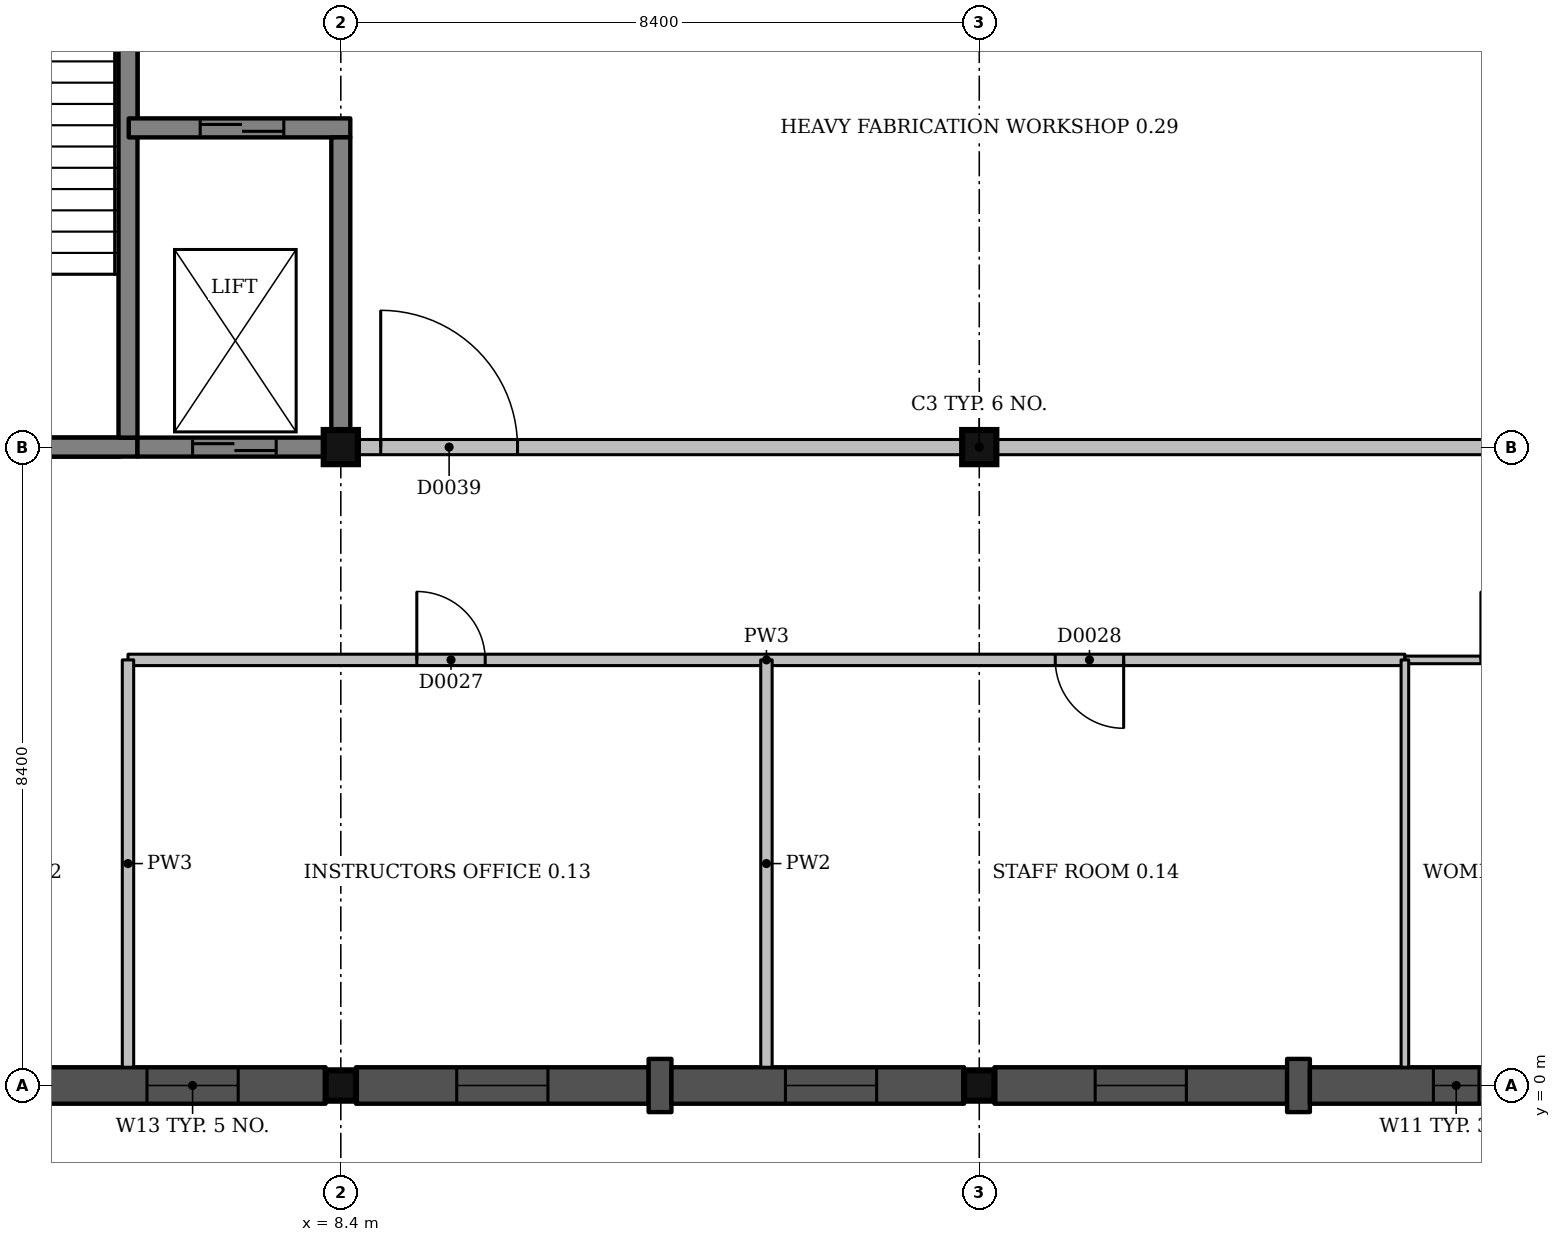
"""IFC4 building model, lengths in metres.
Left out: names, types, materials, properties, quantities, classifications, styles, units other than length and angle.
Written with IfcOpenShell. Run it as: python <this file> out.ifc"""

import sys

from ifc_helpers import new_model, si_unit, direction, frame, frame_2d, origin, origin_2d, place, context, subcontext, project, spatial, rectangle, extrude, element, fill, save


model = new_model("IFC4")
c1 = context("Model", 3, precision=1e-05, world=origin(), true_north=direction((0.0, 1.0)))
c2 = subcontext(c1, "Body", "Model", "MODEL_VIEW")
j1 = project(units=[si_unit("LENGTHUNIT", "METRE"), si_unit("PLANEANGLEUNIT", "RADIAN")], contexts=[c1])
p1 = place(None, origin())
s1 = spatial("IfcSite", under=j1, at=p1, CompositionType="ELEMENT")
p2 = place(p1, origin())
s2 = spatial("IfcBuilding", under=s1, at=p2, CompositionType="ELEMENT")
p3 = place(p2, origin())
s3 = spatial("IfcBuildingStorey", under=s2, at=p3, CompositionType="ELEMENT", Elevation=0.0)
p4 = place(p3, frame((8.4, 0.0, -1.5), z_axis=(0.0, 0.0, 1.0), x_axis=(1.0, 0.0, 0.0)))
e1 = element("IfcColumn", 1, at=p4, inside=s3, PredefinedType="COLUMN", context=c2, shape_type="SweptSolid", body=[
    extrude(rectangle(XDim=0.4, YDim=0.4, at=origin_2d()), origin(), (0.0, 0.0, 1.0), 6.0),
])
p5 = place(p3, frame((8.4, 8.4, -1.5), z_axis=(0.0, 0.0, 1.0), x_axis=(1.0, 0.0, 0.0)))
e2 = element("IfcColumn", 2, at=p5, inside=s3, PredefinedType="COLUMN", context=c2, shape_type="SweptSolid", body=[
    extrude(rectangle(XDim=0.45, YDim=0.45, at=origin_2d()), origin(), (0.0, 0.0, 1.0), 6.0),
])
p6 = place(p3, frame((16.8, 0.0, -1.5), z_axis=(0.0, 0.0, 1.0), x_axis=(1.0, 0.0, 0.0)))
e3 = element("IfcColumn", 3, at=p6, inside=s3, PredefinedType="COLUMN", context=c2, shape_type="SweptSolid", body=[
    extrude(rectangle(XDim=0.4, YDim=0.4, at=origin_2d()), origin(), (0.0, 0.0, 1.0), 6.0),
])
p7 = place(p3, frame((16.8, 8.4, -1.5), z_axis=(0.0, 0.0, 1.0), x_axis=(1.0, 0.0, 0.0)))
e4 = element("IfcColumn", 4, at=p7, inside=s3, PredefinedType="COLUMN", context=c2, shape_type="SweptSolid", body=[
    extrude(rectangle(XDim=0.45, YDim=0.45, at=origin_2d()), origin(), (0.0, 0.0, 1.0), 6.0),
])
p8 = place(p3, frame((5.5, 8.4, 0.0), z_axis=(0.0, 0.0, 1.0), x_axis=(1.0, 0.0, 0.0)))
e5 = element("IfcWall", 5, at=p8, inside=s3, PredefinedType="SHEAR", context=c2, shape_type="SweptSolid", body=[
    extrude(rectangle(XDim=2.675, YDim=0.2, at=frame_2d((1.337, 0.0))), origin(), (0.0, 0.0, 1.0), 4.5),
])
p9 = place(p8, frame((0.95, 0.0, 0.0)))
e6 = element("IfcOpeningElement", 6, at=p9, cuts=e5, PredefinedType="OPENING", context=c2, shape_type="SweptSolid", body=[
    extrude(rectangle(XDim=1.1, YDim=2.1, at=frame_2d((0.55, 1.05))), frame((0.0, 0.11, 0.0), z_axis=(0.0, -1.0, 0.0), x_axis=(1.0, 0.0, 0.0)), (0.0, 0.0, 1.0), 0.22),
])
p10 = place(p3, frame((5.5, 12.6, 0.0), z_axis=(0.0, 0.0, 1.0), x_axis=(1.0, 0.0, 0.0)))
e7 = element("IfcWall", 7, at=p10, inside=s3, PredefinedType="SHEAR", context=c2, shape_type="SweptSolid", body=[
    extrude(rectangle(XDim=3.0, YDim=0.2, at=frame_2d((1.5, 0.0))), origin(), (0.0, 0.0, 1.0), 4.5),
])
p11 = place(p10, frame((1.05, 0.0, 0.0)))
e8 = element("IfcOpeningElement", 8, at=p11, cuts=e7, PredefinedType="OPENING", context=c2, shape_type="SweptSolid", body=[
    extrude(rectangle(XDim=1.1, YDim=2.1, at=frame_2d((0.55, 1.05))), frame((0.0, 0.11, 0.0), z_axis=(0.0, -1.0, 0.0), x_axis=(1.0, 0.0, 0.0)), (0.0, 0.0, 1.0), 0.22),
])
p12 = place(p3, frame((5.6, 8.5, 0.0), z_axis=(0.0, 0.0, 1.0), x_axis=(0.0, 1.0, 0.0)))
e9 = element("IfcWall", 9, at=p12, inside=s3, PredefinedType="SHEAR", context=c2, shape_type="SweptSolid", body=[
    extrude(rectangle(XDim=4.0, YDim=0.2, at=frame_2d((2.0, 0.0))), origin(), (0.0, 0.0, 1.0), 4.5),
])
p13 = place(p3, frame((8.4, 8.625, 0.0), z_axis=(0.0, 0.0, 1.0), x_axis=(0.0, 1.0, 0.0)))
e10 = element("IfcWall", 10, at=p13, inside=s3, PredefinedType="SHEAR", context=c2, shape_type="SweptSolid", body=[
    extrude(rectangle(XDim=3.875, YDim=0.2, at=frame_2d((1.938, 0.0))), origin(), (0.0, 0.0, 1.0), 4.5),
])
p14 = place(p3, frame((0.2, 8.4, 0.0), z_axis=(0.0, 0.0, 1.0), x_axis=(1.0, 0.0, 0.0)))
e11 = element("IfcWall", 11, at=p14, inside=s3, PredefinedType="SHEAR", context=c2, shape_type="SweptSolid", body=[
    extrude(rectangle(XDim=5.3, YDim=0.25, at=frame_2d((2.65, 0.0))), origin(), (0.0, 0.0, 1.0), 4.5),
])
p15 = place(p14, frame((2.125, 0.0, 0.0)))
e12 = element("IfcOpeningElement", 12, at=p15, cuts=e11, PredefinedType="OPENING", context=c2, shape_type="SweptSolid", body=[
    extrude(rectangle(XDim=1.0, YDim=2.1, at=frame_2d((0.5, 1.05))), frame((0.0, 0.135, 0.0), z_axis=(0.0, -1.0, 0.0), x_axis=(1.0, 0.0, 0.0)), (0.0, 0.0, 1.0), 0.27),
])
p16 = place(p3, frame((5.6, 12.61, 0.0), z_axis=(0.0, 0.0, 1.0), x_axis=(0.0, 1.0, 0.0)))
e13 = element("IfcWall", 13, at=p16, inside=s3, PredefinedType="SHEAR", context=c2, shape_type="SweptSolid", body=[
    extrude(rectangle(XDim=4.065, YDim=0.25, at=frame_2d((2.032, 0.0))), origin(), (0.0, 0.0, 1.0), 4.5),
])
p17 = place(p3, frame((-0.125, 8.4, -1.5), z_axis=(0.0, 0.0, 1.0), x_axis=(1.0, 0.0, 0.0)))
e14 = element("IfcWall", 14, at=p17, inside=s3, PredefinedType="SHEAR", context=c2, shape_type="SweptSolid", body=[
    extrude(rectangle(XDim=5.85, YDim=0.25, at=frame_2d((2.925, 0.0))), origin(), (0.0, 0.0, 1.0), 1.5),
])
p18 = place(p3, frame((5.6, 8.525, -1.5), z_axis=(0.0, 0.0, 1.0), x_axis=(0.0, 1.0, 0.0)))
e15 = element("IfcWall", 15, at=p18, inside=s3, PredefinedType="SHEAR", context=c2, shape_type="SweptSolid", body=[
    extrude(rectangle(XDim=8.15, YDim=0.25, at=frame_2d((4.075, 0.0))), origin(), (0.0, 0.0, 1.0), 1.5),
])
p19 = place(p3, frame((5.725, 8.4, -1.5), z_axis=(0.0, 0.0, 1.0), x_axis=(1.0, 0.0, 0.0)))
e16 = element("IfcWall", 16, at=p19, inside=s3, PredefinedType="SHEAR", context=c2, shape_type="SweptSolid", body=[
    extrude(rectangle(XDim=2.8, YDim=0.25, at=frame_2d((1.4, 0.0))), origin(), (0.0, 0.0, 1.0), 1.5),
])
p20 = place(p3, frame((5.61, 12.6, -1.5), z_axis=(0.0, 0.0, 1.0), x_axis=(1.0, 0.0, 0.0)))
e17 = element("IfcWall", 17, at=p20, inside=s3, PredefinedType="SHEAR", context=c2, shape_type="SweptSolid", body=[
    extrude(rectangle(XDim=2.915, YDim=0.25, at=frame_2d((1.458, 0.0))), origin(), (0.0, 0.0, 1.0), 1.5),
])
p21 = place(p3, frame((8.4, 8.525, -1.5), z_axis=(0.0, 0.0, 1.0), x_axis=(0.0, 1.0, 0.0)))
e18 = element("IfcWall", 18, at=p21, inside=s3, PredefinedType="SHEAR", context=c2, shape_type="SweptSolid", body=[
    extrude(rectangle(XDim=3.95, YDim=0.25, at=frame_2d((1.975, 0.0))), origin(), (0.0, 0.0, 1.0), 1.5),
])
p22 = place(p3, frame((4.35, 0.0, 0.0), z_axis=(0.0, 0.0, 1.0), x_axis=(1.0, 0.0, 0.0)))
e19 = element("IfcWall", 19, at=p22, inside=s3, PredefinedType="SOLIDWALL", context=c2, shape_type="SweptSolid", body=[
    extrude(rectangle(XDim=3.85, YDim=0.48, at=frame_2d((1.925, 0.0))), origin(), (0.0, 0.0, 1.0), 3.45),
])
p23 = place(p22, frame((1.5, 0.0, 0.9)))
e20 = element("IfcOpeningElement", 20, at=p23, cuts=e19, PredefinedType="OPENING", context=c2, shape_type="SweptSolid", body=[
    extrude(rectangle(XDim=1.2, YDim=2.1, at=frame_2d((0.6, 1.05))), frame((0.0, 0.25, 0.0), z_axis=(0.0, -1.0, 0.0), x_axis=(1.0, 0.0, 0.0)), (0.0, 0.0, 1.0), 0.5),
])
p24 = place(p3, frame((8.6, 0.0, 0.0), z_axis=(0.0, 0.0, 1.0), x_axis=(1.0, 0.0, 0.0)))
e21 = element("IfcWall", 21, at=p24, inside=s3, PredefinedType="SOLIDWALL", context=c2, shape_type="SweptSolid", body=[
    extrude(rectangle(XDim=3.85, YDim=0.48, at=frame_2d((1.925, 0.0))), origin(), (0.0, 0.0, 1.0), 3.45),
])
p25 = place(p24, frame((1.325, 0.0, 0.9)))
e22 = element("IfcOpeningElement", 22, at=p25, cuts=e21, PredefinedType="OPENING", context=c2, shape_type="SweptSolid", body=[
    extrude(rectangle(XDim=1.2, YDim=2.1, at=frame_2d((0.6, 1.05))), frame((0.0, 0.25, 0.0), z_axis=(0.0, -1.0, 0.0), x_axis=(1.0, 0.0, 0.0)), (0.0, 0.0, 1.0), 0.5),
])
p26 = place(p3, frame((12.45, 0.0, 0.0), z_axis=(0.0, 0.0, 1.0), x_axis=(1.0, 0.0, 0.0)))
e23 = element("IfcWall", 23, at=p26, inside=s3, PredefinedType="SOLIDWALL", context=c2, shape_type="SweptSolid", body=[
    extrude(rectangle(XDim=0.3, YDim=0.7, at=frame_2d((0.15, 0.0))), origin(), (0.0, 0.0, 1.0), 3.45),
])
p27 = place(p3, frame((12.75, 0.0, 0.0), z_axis=(0.0, 0.0, 1.0), x_axis=(1.0, 0.0, 0.0)))
e24 = element("IfcWall", 24, at=p27, inside=s3, PredefinedType="SOLIDWALL", context=c2, shape_type="SweptSolid", body=[
    extrude(rectangle(XDim=3.85, YDim=0.48, at=frame_2d((1.925, 0.0))), origin(), (0.0, 0.0, 1.0), 3.45),
])
p28 = place(p27, frame((1.5, 0.0, 0.9)))
e25 = element("IfcOpeningElement", 25, at=p28, cuts=e24, PredefinedType="OPENING", context=c2, shape_type="SweptSolid", body=[
    extrude(rectangle(XDim=1.2, YDim=2.1, at=frame_2d((0.6, 1.05))), frame((0.0, 0.25, 0.0), z_axis=(0.0, -1.0, 0.0), x_axis=(1.0, 0.0, 0.0)), (0.0, 0.0, 1.0), 0.5),
])
p29 = place(p3, frame((17.0, 0.0, 0.0), z_axis=(0.0, 0.0, 1.0), x_axis=(1.0, 0.0, 0.0)))
e26 = element("IfcWall", 26, at=p29, inside=s3, PredefinedType="SOLIDWALL", context=c2, shape_type="SweptSolid", body=[
    extrude(rectangle(XDim=3.85, YDim=0.48, at=frame_2d((1.925, 0.0))), origin(), (0.0, 0.0, 1.0), 3.45),
])
p30 = place(p29, frame((1.325, 0.0, 0.9)))
e27 = element("IfcOpeningElement", 27, at=p30, cuts=e26, PredefinedType="OPENING", context=c2, shape_type="SweptSolid", body=[
    extrude(rectangle(XDim=1.2, YDim=2.1, at=frame_2d((0.6, 1.05))), frame((0.0, 0.25, 0.0), z_axis=(0.0, -1.0, 0.0), x_axis=(1.0, 0.0, 0.0)), (0.0, 0.0, 1.0), 0.5),
])
p31 = place(p3, frame((20.85, 0.0, 0.0), z_axis=(0.0, 0.0, 1.0), x_axis=(1.0, 0.0, 0.0)))
e28 = element("IfcWall", 28, at=p31, inside=s3, PredefinedType="SOLIDWALL", context=c2, shape_type="SweptSolid", body=[
    extrude(rectangle(XDim=0.3, YDim=0.7, at=frame_2d((0.15, 0.0))), origin(), (0.0, 0.0, 1.0), 3.45),
])
p32 = place(p3, frame((21.15, 0.0, 0.0), z_axis=(0.0, 0.0, 1.0), x_axis=(1.0, 0.0, 0.0)))
e29 = element("IfcWall", 29, at=p32, inside=s3, PredefinedType="SOLIDWALL", context=c2, shape_type="SweptSolid", body=[
    extrude(rectangle(XDim=3.85, YDim=0.48, at=frame_2d((1.925, 0.0))), origin(), (0.0, 0.0, 1.0), 3.45),
])
p33 = place(p32, frame((1.625, 0.0, 1.5)))
e30 = element("IfcOpeningElement", 30, at=p33, cuts=e29, PredefinedType="OPENING", context=c2, shape_type="SweptSolid", body=[
    extrude(rectangle(XDim=0.6, YDim=1.2, at=frame_2d((0.3, 0.6))), frame((0.0, 0.25, 0.0), z_axis=(0.0, -1.0, 0.0), x_axis=(1.0, 0.0, 0.0)), (0.0, 0.0, 1.0), 0.5),
])
p34 = place(p3, frame((5.6, 5.6, 0.0), z_axis=(0.0, 0.0, 1.0), x_axis=(1.0, 0.0, 0.0)))
e31 = element("IfcWall", 31, at=p34, inside=s3, PredefinedType="PARTITIONING", context=c2, shape_type="SweptSolid", body=[
    extrude(rectangle(XDim=16.8, YDim=0.15, at=frame_2d((8.4, 0.0))), origin(), (0.0, 0.0, 1.0), 3.5),
])
p35 = place(p34, frame((3.8, 0.0, 0.0)))
e32 = element("IfcOpeningElement", 32, at=p35, cuts=e31, PredefinedType="OPENING", context=c2, shape_type="SweptSolid", body=[
    extrude(rectangle(XDim=0.9, YDim=2.1, at=frame_2d((0.45, 1.05))), frame((0.0, 0.085, 0.0), z_axis=(0.0, -1.0, 0.0), x_axis=(1.0, 0.0, 0.0)), (0.0, 0.0, 1.0), 0.17),
])
p36 = place(p34, frame((12.2, 0.0, 0.0)))
e33 = element("IfcOpeningElement", 33, at=p36, cuts=e31, PredefinedType="OPENING", context=c2, shape_type="SweptSolid", body=[
    extrude(rectangle(XDim=0.9, YDim=2.1, at=frame_2d((0.45, 1.05))), frame((0.0, 0.085, 0.0), z_axis=(0.0, -1.0, 0.0), x_axis=(1.0, 0.0, 0.0)), (0.0, 0.0, 1.0), 0.17),
])
p37 = place(p3, frame((22.4, 5.6, 0.0), z_axis=(0.0, 0.0, 1.0), x_axis=(1.0, 0.0, 0.0)))
e34 = element("IfcWall", 34, at=p37, inside=s3, PredefinedType="PARTITIONING", context=c2, shape_type="SweptSolid", body=[
    extrude(rectangle(XDim=5.6, YDim=0.1, at=frame_2d((2.8, 0.0))), origin(), (0.0, 0.0, 1.0), 3.5),
])
p38 = place(p37, frame((1.0, 0.0, 0.0)))
e35 = element("IfcOpeningElement", 35, at=p38, cuts=e34, PredefinedType="OPENING", context=c2, shape_type="SweptSolid", body=[
    extrude(rectangle(XDim=0.9, YDim=2.1, at=frame_2d((0.45, 1.05))), frame((0.0, 0.06, 0.0), z_axis=(0.0, -1.0, 0.0), x_axis=(1.0, 0.0, 0.0)), (0.0, 0.0, 1.0), 0.12),
])
p39 = place(p37, frame((3.8, 0.0, 0.0)))
e36 = element("IfcOpeningElement", 36, at=p39, cuts=e34, PredefinedType="OPENING", context=c2, shape_type="SweptSolid", body=[
    extrude(rectangle(XDim=0.9, YDim=2.1, at=frame_2d((0.45, 1.05))), frame((0.0, 0.06, 0.0), z_axis=(0.0, -1.0, 0.0), x_axis=(1.0, 0.0, 0.0)), (0.0, 0.0, 1.0), 0.12),
])
p40 = place(p3, frame((8.625, 8.4, 0.0), z_axis=(0.0, 0.0, 1.0), x_axis=(1.0, 0.0, 0.0)))
e37 = element("IfcWall", 37, at=p40, inside=s3, PredefinedType="PARTITIONING", context=c2, shape_type="SweptSolid", body=[
    extrude(rectangle(XDim=7.95, YDim=0.2, at=frame_2d((3.975, 0.0))), origin(), (0.0, 0.0, 1.0), 3.5),
])
p41 = place(p40, frame((0.3, 0.0, 0.0)))
e38 = element("IfcOpeningElement", 38, at=p41, cuts=e37, PredefinedType="OPENING", context=c2, shape_type="SweptSolid", body=[
    extrude(rectangle(XDim=1.8, YDim=2.1, at=frame_2d((0.9, 1.05))), frame((0.0, 0.11, 0.0), z_axis=(0.0, -1.0, 0.0), x_axis=(1.0, 0.0, 0.0)), (0.0, 0.0, 1.0), 0.22),
])
p42 = place(p3, frame((17.025, 8.4, 0.0), z_axis=(0.0, 0.0, 1.0), x_axis=(1.0, 0.0, 0.0)))
e39 = element("IfcWall", 39, at=p42, inside=s3, PredefinedType="PARTITIONING", context=c2, shape_type="SweptSolid", body=[
    extrude(rectangle(XDim=7.95, YDim=0.2, at=frame_2d((3.975, 0.0))), origin(), (0.0, 0.0, 1.0), 3.5),
])
for number, where, z_axis, x_axis in (
    (40, (5.6, 0.24, 0.0), (0.0, 0.0, 1.0), (0.0, 1.0, 0.0)),
    (41, (14.0, 0.24, 0.0), (0.0, 0.0, 1.0), (0.0, 1.0, 0.0)),
):
    element("IfcWall", number, at=place(p3, frame(where, z_axis=z_axis, x_axis=x_axis)), inside=s3, PredefinedType="PARTITIONING", context=c2, shape_type="SweptSolid", body=[
        extrude(rectangle(XDim=5.36, YDim=0.15, at=frame_2d((2.68, 0.0))), origin(), (0.0, 0.0, 1.0), 4.15),
    ])
p43 = place(p3, frame((22.4, 0.24, 0.0), z_axis=(0.0, 0.0, 1.0), x_axis=(0.0, 1.0, 0.0)))
e42 = element("IfcWall", 42, at=p43, inside=s3, PredefinedType="PARTITIONING", context=c2, shape_type="SweptSolid", body=[
    extrude(rectangle(XDim=5.36, YDim=0.1, at=frame_2d((2.68, 0.0))), origin(), (0.0, 0.0, 1.0), 4.15),
])
p44 = place(p23, origin())
e43 = element("IfcWindow", 43, at=p44, inside=s3, PartitioningType="SINGLE_PANEL", PredefinedType="WINDOW", context=c2, shape_type="SweptSolid", body=[
    extrude(rectangle(XDim=1.2, YDim=2.1, at=frame_2d((0.6, 1.05))), frame((0.0, 0.12, 0.0), z_axis=(0.0, -1.0, 0.0), x_axis=(1.0, 0.0, 0.0)), (0.0, 0.0, 1.0), 0.06),
])
fill(e20, e43)
p45 = place(p25, origin())
e44 = element("IfcWindow", 44, at=p45, inside=s3, PartitioningType="SINGLE_PANEL", PredefinedType="WINDOW", context=c2, shape_type="SweptSolid", body=[
    extrude(rectangle(XDim=1.2, YDim=2.1, at=frame_2d((0.6, 1.05))), frame((0.0, 0.12, 0.0), z_axis=(0.0, -1.0, 0.0), x_axis=(1.0, 0.0, 0.0)), (0.0, 0.0, 1.0), 0.06),
])
fill(e22, e44)
p46 = place(p28, origin())
e45 = element("IfcWindow", 45, at=p46, inside=s3, PartitioningType="SINGLE_PANEL", PredefinedType="WINDOW", context=c2, shape_type="SweptSolid", body=[
    extrude(rectangle(XDim=1.2, YDim=2.1, at=frame_2d((0.6, 1.05))), frame((0.0, 0.12, 0.0), z_axis=(0.0, -1.0, 0.0), x_axis=(1.0, 0.0, 0.0)), (0.0, 0.0, 1.0), 0.06),
])
fill(e25, e45)
p47 = place(p30, origin())
e46 = element("IfcWindow", 46, at=p47, inside=s3, PartitioningType="SINGLE_PANEL", PredefinedType="WINDOW", context=c2, shape_type="SweptSolid", body=[
    extrude(rectangle(XDim=1.2, YDim=2.1, at=frame_2d((0.6, 1.05))), frame((0.0, 0.12, 0.0), z_axis=(0.0, -1.0, 0.0), x_axis=(1.0, 0.0, 0.0)), (0.0, 0.0, 1.0), 0.06),
])
fill(e27, e46)
p48 = place(p33, origin())
e47 = element("IfcWindow", 47, at=p48, inside=s3, PartitioningType="SINGLE_PANEL", PredefinedType="WINDOW", context=c2, shape_type="SweptSolid", body=[
    extrude(rectangle(XDim=0.6, YDim=1.2, at=frame_2d((0.3, 0.6))), frame((0.0, 0.12, 0.0), z_axis=(0.0, -1.0, 0.0), x_axis=(1.0, 0.0, 0.0)), (0.0, 0.0, 1.0), 0.06),
])
fill(e30, e47)
p49 = place(p35, origin())
e48 = element("IfcDoor", 48, at=p49, inside=s3, OperationType="SINGLE_SWING_LEFT", PredefinedType="DOOR", context=c2, shape_type="SweptSolid", body=[
    extrude(rectangle(XDim=0.9, YDim=2.1, at=frame_2d((0.45, 1.05))), frame((0.0, 0.025, 0.0), z_axis=(0.0, -1.0, 0.0), x_axis=(1.0, 0.0, 0.0)), (0.0, 0.0, 1.0), 0.05),
])
fill(e32, e48)
p50 = place(p36, origin())
e49 = element("IfcDoor", 49, at=p50, inside=s3, OperationType="SINGLE_SWING_RIGHT", PredefinedType="DOOR", context=c2, shape_type="SweptSolid", body=[
    extrude(rectangle(XDim=0.9, YDim=2.1, at=frame_2d((0.45, 1.05))), frame((0.0, 0.025, 0.0), z_axis=(0.0, -1.0, 0.0), x_axis=(1.0, 0.0, 0.0)), (0.0, 0.0, 1.0), 0.05),
])
fill(e33, e49)
p51 = place(p41, origin())
e50 = element("IfcDoor", 50, at=p51, inside=s3, OperationType="DOUBLE_DOOR_SINGLE_SWING", PredefinedType="DOOR", context=c2, shape_type="SweptSolid", body=[
    extrude(rectangle(XDim=1.8, YDim=2.1, at=frame_2d((0.9, 1.05))), frame((0.0, 0.025, 0.0), z_axis=(0.0, -1.0, 0.0), x_axis=(1.0, 0.0, 0.0)), (0.0, 0.0, 1.0), 0.05),
])
fill(e38, e50)
p52 = place(p9, origin())
e51 = element("IfcDoor", 51, at=p52, inside=s3, OperationType="SLIDING_TO_RIGHT", PredefinedType="DOOR", context=c2, shape_type="SweptSolid", body=[
    extrude(rectangle(XDim=1.1, YDim=2.1, at=frame_2d((0.55, 1.05))), frame((0.0, 0.025, 0.0), z_axis=(0.0, -1.0, 0.0), x_axis=(1.0, 0.0, 0.0)), (0.0, 0.0, 1.0), 0.05),
])
fill(e6, e51)
p53 = place(p11, origin())
e52 = element("IfcDoor", 52, at=p53, inside=s3, OperationType="SLIDING_TO_LEFT", PredefinedType="DOOR", context=c2, shape_type="SweptSolid", body=[
    extrude(rectangle(XDim=1.1, YDim=2.1, at=frame_2d((0.55, 1.05))), frame((0.0, 0.025, 0.0), z_axis=(0.0, -1.0, 0.0), x_axis=(1.0, 0.0, 0.0)), (0.0, 0.0, 1.0), 0.05),
])
fill(e8, e52)
save(model, sys.argv[1])
